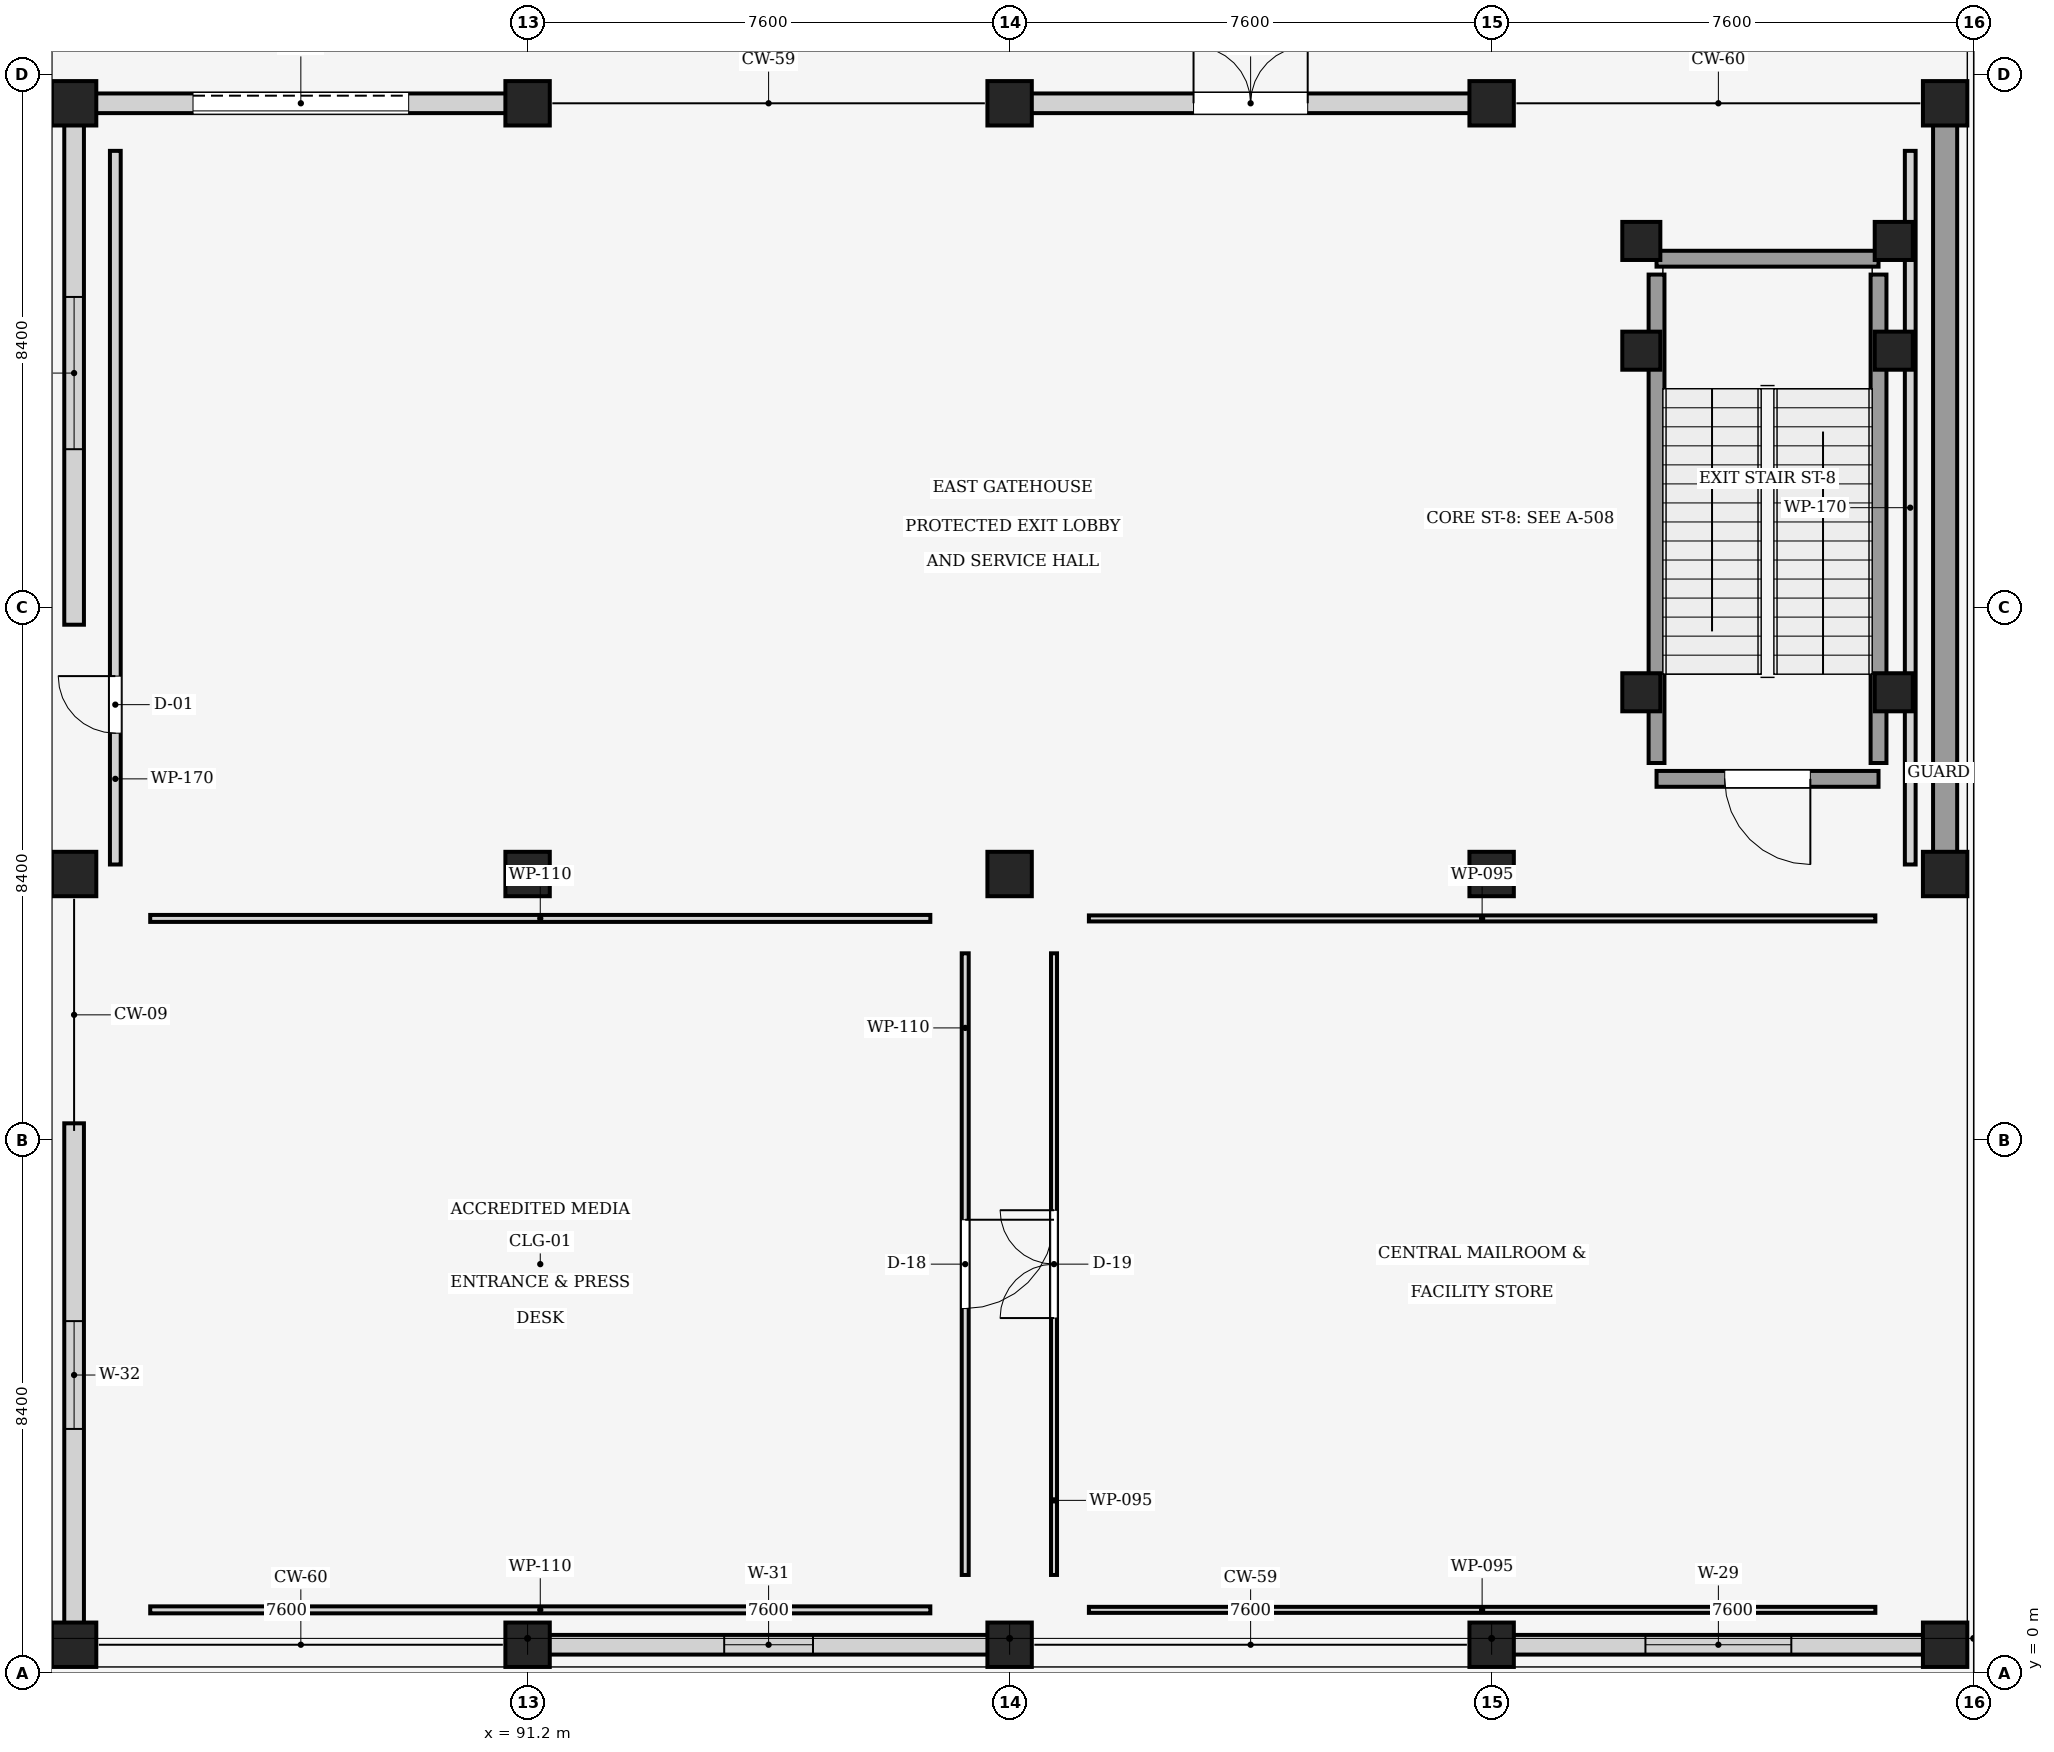
"""IFC4 building model, lengths in metres.
Left out: names, types, materials, properties, quantities, classifications, styles, units other than length and angle.
Written with IfcOpenShell. Run it as: python <this file> out.ifc"""

import sys

from ifc_helpers import new_model, si_unit, direction, frame, frame_2d, origin, origin_2d, place, context, subcontext, project, spatial, rectangle, extrude, element, fill, save


model = new_model("IFC4")
c1 = context("Model", 3, precision=1e-05, world=origin(), true_north=direction((0.0, 1.0)))
c2 = subcontext(c1, "Body", "Model", "MODEL_VIEW")
j1 = project(units=[si_unit("LENGTHUNIT", "METRE"), si_unit("PLANEANGLEUNIT", "RADIAN")], contexts=[c1])
p1 = place(None, origin())
s1 = spatial("IfcSite", under=j1, at=p1, CompositionType="ELEMENT")
p2 = place(p1, origin())
s2 = spatial("IfcBuilding", under=s1, at=p2, CompositionType="ELEMENT")
p3 = place(p2, origin())
s3 = spatial("IfcBuildingStorey", under=s2, at=p3, CompositionType="ELEMENT", Elevation=0.0)
for number, where, z_axis, x_axis in (
    (1, (84.05, 0.45, 0.0), (0.0, 0.0, 1.0), (1.0, 0.0, 0.0)),
    (2, (84.05, 12.6, 0.0), (0.0, 0.0, 1.0), (1.0, 0.0, 0.0)),
    (3, (84.05, 24.75, 0.0), (0.0, 0.0, 1.0), (1.0, 0.0, 0.0)),
    (4, (91.2, 0.45, 0.0), (0.0, 0.0, 1.0), (1.0, 0.0, 0.0)),
    (5, (91.2, 12.6, 0.0), (0.0, 0.0, 1.0), (1.0, 0.0, 0.0)),
    (6, (91.2, 24.75, 0.0), (0.0, 0.0, 1.0), (1.0, 0.0, 0.0)),
    (7, (98.8, 0.45, 0.0), (0.0, 0.0, 1.0), (1.0, 0.0, 0.0)),
    (8, (98.8, 12.6, 0.0), (0.0, 0.0, 1.0), (1.0, 0.0, 0.0)),
    (9, (98.8, 24.75, 0.0), (0.0, 0.0, 1.0), (1.0, 0.0, 0.0)),
    (10, (106.4, 0.45, 0.0), (0.0, 0.0, 1.0), (1.0, 0.0, 0.0)),
    (11, (106.4, 12.6, 0.0), (0.0, 0.0, 1.0), (1.0, 0.0, 0.0)),
    (12, (106.4, 24.75, 0.0), (0.0, 0.0, 1.0), (1.0, 0.0, 0.0)),
    (13, (113.55, 0.45, 0.0), (0.0, 0.0, 1.0), (1.0, 0.0, 0.0)),
    (14, (113.55, 12.6, 0.0), (0.0, 0.0, 1.0), (1.0, 0.0, 0.0)),
    (15, (113.55, 24.75, 0.0), (0.0, 0.0, 1.0), (1.0, 0.0, 0.0)),
):
    element("IfcColumn", number, at=place(p3, frame(where, z_axis=z_axis, x_axis=x_axis)), inside=s3, PredefinedType="COLUMN", context=c2, shape_type="SweptSolid", body=[
        extrude(rectangle(XDim=0.7, YDim=0.7, at=origin_2d()), origin(), (0.0, 0.0, 1.0), 5.1),
    ])
for number, where, z_axis, x_axis in (
    (16, (112.74, 15.465, 0.0), (0.0, 0.0, 1.0), (1.0, 0.0, 0.0)),
    (17, (108.76, 15.465, 0.0), (0.0, 0.0, 1.0), (1.0, 0.0, 0.0)),
    (18, (112.74, 20.85, 0.0), (0.0, 0.0, 1.0), (1.0, 0.0, 0.0)),
    (19, (108.76, 20.85, 0.0), (0.0, 0.0, 1.0), (1.0, 0.0, 0.0)),
    (20, (112.74, 22.58, 0.0), (0.0, 0.0, 1.0), (1.0, 0.0, 0.0)),
    (21, (108.76, 22.58, 0.0), (0.0, 0.0, 1.0), (1.0, 0.0, 0.0)),
):
    element("IfcColumn", number, at=place(p3, frame(where, z_axis=z_axis, x_axis=x_axis)), inside=s3, PredefinedType="COLUMN", context=c2, shape_type="SweptSolid", body=[
        extrude(rectangle(XDim=0.6, YDim=0.6, at=origin_2d()), origin(), (0.0, 0.0, 1.0), 5.1),
    ])
p4 = place(p3, frame((113.265, 0.45, 0.0), z_axis=(0.0, 0.0, 1.0), x_axis=(-1.0, 0.0, 0.0)))
e22 = element("IfcWall", 22, at=p4, inside=s3, PredefinedType="STANDARD", context=c2, shape_type="SweptSolid", body=[
    extrude(rectangle(XDim=6.58, YDim=0.31, at=frame_2d((3.29, 0.0))), origin(), (0.0, 0.0, 1.0), 4.045),
])
p5 = place(p4, frame((2.14, 0.0, 0.85)))
e23 = element("IfcOpeningElement", 23, at=p5, cuts=e22, PredefinedType="OPENING", context=c2, shape_type="SweptSolid", body=[
    extrude(rectangle(XDim=2.3, YDim=1.85, at=frame_2d((1.15, 0.925))), frame((0.0, 0.165, 0.0), z_axis=(0.0, -1.0, 0.0), x_axis=(1.0, 0.0, 0.0)), (0.0, 0.0, 1.0), 0.33),
])
p6 = place(p3, frame((98.515, 0.45, 0.0), z_axis=(0.0, 0.0, 1.0), x_axis=(-1.0, 0.0, 0.0)))
e24 = element("IfcWall", 24, at=p6, inside=s3, PredefinedType="STANDARD", context=c2, shape_type="SweptSolid", body=[
    extrude(rectangle(XDim=7.03, YDim=0.31, at=frame_2d((3.515, 0.0))), origin(), (0.0, 0.0, 1.0), 4.045),
])
p7 = place(p6, frame((2.815, 0.0, 0.85)))
e25 = element("IfcOpeningElement", 25, at=p7, cuts=e24, PredefinedType="OPENING", context=c2, shape_type="SweptSolid", body=[
    extrude(rectangle(XDim=1.4, YDim=2.05, at=frame_2d((0.7, 1.025))), frame((0.0, 0.165, 0.0), z_axis=(0.0, -1.0, 0.0), x_axis=(1.0, 0.0, 0.0)), (0.0, 0.0, 1.0), 0.33),
])
p8 = place(p3, frame((113.55, 24.465, 0.0), z_axis=(0.0, 0.0, 1.0), x_axis=(0.0, -1.0, 0.0)))
e26 = element("IfcWall", 26, at=p8, inside=s3, PredefinedType="SHEAR", context=c2, shape_type="SweptSolid", body=[
    extrude(rectangle(XDim=11.58, YDim=0.38, at=frame_2d((5.79, 0.0))), origin(), (0.0, 0.0, 1.0), 4.75),
])
p9 = place(p3, frame((84.335, 24.75, 0.0), z_axis=(0.0, 0.0, 1.0), x_axis=(1.0, 0.0, 0.0)))
e27 = element("IfcWall", 27, at=p9, inside=s3, PredefinedType="STANDARD", context=c2, shape_type="SweptSolid", body=[
    extrude(rectangle(XDim=6.58, YDim=0.31, at=frame_2d((3.29, 0.0))), origin(), (0.0, 0.0, 1.0), 4.045),
])
p10 = place(p9, frame((1.59, 0.0, 0.0)))
e28 = element("IfcOpeningElement", 28, at=p10, cuts=e27, PredefinedType="OPENING", context=c2, shape_type="SweptSolid", body=[
    extrude(rectangle(XDim=3.4, YDim=3.0, at=frame_2d((1.7, 1.5))), frame((0.0, 0.165, 0.0), z_axis=(0.0, -1.0, 0.0), x_axis=(1.0, 0.0, 0.0)), (0.0, 0.0, 1.0), 0.33),
])
p11 = place(p3, frame((99.085, 24.75, 0.0), z_axis=(0.0, 0.0, 1.0), x_axis=(1.0, 0.0, 0.0)))
e29 = element("IfcWall", 29, at=p11, inside=s3, PredefinedType="STANDARD", context=c2, shape_type="SweptSolid", body=[
    extrude(rectangle(XDim=7.03, YDim=0.31, at=frame_2d((3.515, 0.0))), origin(), (0.0, 0.0, 1.0), 4.045),
])
p12 = place(p11, frame((2.615, 0.0, 0.0)))
e30 = element("IfcOpeningElement", 30, at=p12, cuts=e29, PredefinedType="OPENING", context=c2, shape_type="SweptSolid", body=[
    extrude(rectangle(XDim=1.8, YDim=2.35, at=frame_2d((0.9, 1.175))), frame((0.0, 0.165, 0.0), z_axis=(0.0, -1.0, 0.0), x_axis=(1.0, 0.0, 0.0)), (0.0, 0.0, 1.0), 0.33),
])
p13 = place(p3, frame((84.05, 0.735, 0.0), z_axis=(0.0, 0.0, 1.0), x_axis=(0.0, 1.0, 0.0)))
e31 = element("IfcWall", 31, at=p13, inside=s3, PredefinedType="STANDARD", context=c2, shape_type="SweptSolid", body=[
    extrude(rectangle(XDim=7.935, YDim=0.31, at=frame_2d((3.967, 0.0))), origin(), (0.0, 0.0, 1.0), 4.195),
])
p14 = place(p13, frame((3.117, 0.0, 0.85)))
e32 = element("IfcOpeningElement", 32, at=p14, cuts=e31, PredefinedType="OPENING", context=c2, shape_type="SweptSolid", body=[
    extrude(rectangle(XDim=1.7, YDim=2.05, at=frame_2d((0.85, 1.025))), frame((0.0, 0.165, 0.0), z_axis=(0.0, -1.0, 0.0), x_axis=(1.0, 0.0, 0.0)), (0.0, 0.0, 1.0), 0.33),
])
p15 = place(p3, frame((84.05, 16.53, 0.0), z_axis=(0.0, 0.0, 1.0), x_axis=(0.0, 1.0, 0.0)))
e33 = element("IfcWall", 33, at=p15, inside=s3, PredefinedType="STANDARD", context=c2, shape_type="SweptSolid", body=[
    extrude(rectangle(XDim=7.935, YDim=0.31, at=frame_2d((3.968, 0.0))), origin(), (0.0, 0.0, 1.0), 4.195),
])
p16 = place(p15, frame((2.767, 0.0, 0.85)))
e34 = element("IfcOpeningElement", 34, at=p16, cuts=e33, PredefinedType="OPENING", context=c2, shape_type="SweptSolid", body=[
    extrude(rectangle(XDim=2.4, YDim=2.05, at=frame_2d((1.2, 1.025))), frame((0.0, 0.165, 0.0), z_axis=(0.0, -1.0, 0.0), x_axis=(1.0, 0.0, 0.0)), (0.0, 0.0, 1.0), 0.33),
])
p17 = place(p3, frame((112.5, 14.1, 0.0), z_axis=(0.0, 0.0, 1.0), x_axis=(-1.0, 0.0, 0.0)))
e35 = element("IfcWall", 35, at=p17, inside=s3, PredefinedType="SHEAR", context=c2, shape_type="SweptSolid", body=[
    extrude(rectangle(XDim=3.5, YDim=0.25, at=frame_2d((1.75, 0.0))), origin(), (0.0, 0.0, 1.0), 5.1),
])
p18 = place(p17, frame((1.075, 0.0, 0.0)))
e36 = element("IfcOpeningElement", 36, at=p18, cuts=e35, PredefinedType="OPENING", context=c2, shape_type="SweptSolid", body=[
    extrude(rectangle(XDim=1.35, YDim=2.2, at=frame_2d((0.675, 1.1))), frame((0.0, 0.135, 0.0), z_axis=(0.0, -1.0, 0.0), x_axis=(1.0, 0.0, 0.0)), (0.0, 0.0, 1.0), 0.27),
])
p19 = place(p3, frame((109.0, 14.35, 0.0), z_axis=(0.0, 0.0, 1.0), x_axis=(0.0, 1.0, 0.0)))
e37 = element("IfcWall", 37, at=p19, inside=s3, PredefinedType="SHEAR", context=c2, shape_type="SweptSolid", body=[
    extrude(rectangle(XDim=7.7, YDim=0.25, at=frame_2d((3.85, 0.0))), origin(), (0.0, 0.0, 1.0), 5.1),
])
p20 = place(p3, frame((109.0, 22.3, 0.0), z_axis=(0.0, 0.0, 1.0), x_axis=(1.0, 0.0, 0.0)))
e38 = element("IfcWall", 38, at=p20, inside=s3, PredefinedType="SHEAR", context=c2, shape_type="SweptSolid", body=[
    extrude(rectangle(XDim=3.5, YDim=0.25, at=frame_2d((1.75, 0.0))), origin(), (0.0, 0.0, 1.0), 5.1),
])
p21 = place(p3, frame((112.5, 22.05, 0.0), z_axis=(0.0, 0.0, 1.0), x_axis=(0.0, -1.0, 0.0)))
e39 = element("IfcWall", 39, at=p21, inside=s3, PredefinedType="SHEAR", context=c2, shape_type="SweptSolid", body=[
    extrude(rectangle(XDim=7.7, YDim=0.25, at=frame_2d((3.85, 0.0))), origin(), (0.0, 0.0, 1.0), 5.1),
])
p22 = place(p3, frame((98.1, 11.35, 0.0), z_axis=(0.0, 0.0, 1.0), x_axis=(0.0, -1.0, 0.0)))
e40 = element("IfcWall", 40, at=p22, inside=s3, PredefinedType="PARTITIONING", context=c2, shape_type="SweptSolid", body=[
    extrude(rectangle(XDim=9.8, YDim=0.11, at=frame_2d((4.9, 0.0))), origin(), (0.0, 0.0, 1.0), 4.73),
])
p23 = place(p22, frame((4.2, 0.0, 0.0)))
e41 = element("IfcOpeningElement", 41, at=p23, cuts=e40, PredefinedType="OPENING", context=c2, shape_type="SweptSolid", body=[
    extrude(rectangle(XDim=1.4, YDim=2.35, at=frame_2d((0.7, 1.175))), frame((0.0, 0.065, 0.0), z_axis=(0.0, -1.0, 0.0), x_axis=(1.0, 0.0, 0.0)), (0.0, 0.0, 1.0), 0.13),
])
for number, where, z_axis, x_axis in (
    (42, (85.25, 11.9, 0.0), (0.0, 0.0, 1.0), (1.0, 0.0, 0.0)),
    (43, (97.55, 1.0, 0.0), (0.0, 0.0, 1.0), (-1.0, 0.0, 0.0)),
):
    element("IfcWall", number, at=place(p3, frame(where, z_axis=z_axis, x_axis=x_axis)), inside=s3, PredefinedType="PARTITIONING", context=c2, shape_type="SweptSolid", body=[
        extrude(rectangle(XDim=12.3, YDim=0.11, at=frame_2d((6.15, 0.0))), origin(), (0.0, 0.0, 1.0), 4.195),
    ])
p24 = place(p3, frame((99.5, 1.55, 0.0), z_axis=(0.0, 0.0, 1.0), x_axis=(0.0, 1.0, 0.0)))
e44 = element("IfcWall", 44, at=p24, inside=s3, PredefinedType="PARTITIONING", context=c2, shape_type="SweptSolid", body=[
    extrude(rectangle(XDim=9.8, YDim=0.095, at=frame_2d((4.9, 0.0))), origin(), (0.0, 0.0, 1.0), 4.73),
])
p25 = place(p24, frame((4.05, 0.0, 0.0)))
e45 = element("IfcOpeningElement", 45, at=p25, cuts=e44, PredefinedType="OPENING", context=c2, shape_type="SweptSolid", body=[
    extrude(rectangle(XDim=1.7, YDim=2.35, at=frame_2d((0.85, 1.175))), frame((0.0, 0.057, 0.0), z_axis=(0.0, -1.0, 0.0), x_axis=(1.0, 0.0, 0.0)), (0.0, 0.0, 1.0), 0.115),
])
for number, where, z_axis, x_axis in (
    (46, (100.05, 11.9, 0.0), (0.0, 0.0, 1.0), (1.0, 0.0, 0.0)),
    (47, (112.45, 1.0, 0.0), (0.0, 0.0, 1.0), (-1.0, 0.0, 0.0)),
):
    element("IfcWall", number, at=place(p3, frame(where, z_axis=z_axis, x_axis=x_axis)), inside=s3, PredefinedType="PARTITIONING", context=c2, shape_type="SweptSolid", body=[
        extrude(rectangle(XDim=12.4, YDim=0.095, at=frame_2d((6.2, 0.0))), origin(), (0.0, 0.0, 1.0), 4.195),
    ])
p26 = place(p3, frame((84.7, 12.75, 0.0), z_axis=(0.0, 0.0, 1.0), x_axis=(0.0, 1.0, 0.0)))
e48 = element("IfcWall", 48, at=p26, inside=s3, PredefinedType="PARTITIONING", context=c2, shape_type="SweptSolid", body=[
    extrude(rectangle(XDim=11.25, YDim=0.17, at=frame_2d((5.625, 0.0))), origin(), (0.0, 0.0, 1.0), 4.045),
])
p27 = place(p26, frame((2.07, 0.0, 0.0)))
e49 = element("IfcOpeningElement", 49, at=p27, cuts=e48, PredefinedType="OPENING", context=c2, shape_type="SweptSolid", body=[
    extrude(rectangle(XDim=0.9, YDim=2.1, at=frame_2d((0.45, 1.05))), frame((0.0, 0.095, 0.0), z_axis=(0.0, -1.0, 0.0), x_axis=(1.0, 0.0, 0.0)), (0.0, 0.0, 1.0), 0.19),
])
p28 = place(p3, frame((113.0, 24.0, 0.0), z_axis=(0.0, 0.0, 1.0), x_axis=(0.0, -1.0, 0.0)))
e50 = element("IfcWall", 50, at=p28, inside=s3, PredefinedType="PARTITIONING", context=c2, shape_type="SweptSolid", body=[
    extrude(rectangle(XDim=11.25, YDim=0.17, at=frame_2d((5.625, 0.0))), origin(), (0.0, 0.0, 1.0), 2.45),
])
p29 = place(p5, origin())
e51 = element("IfcWindow", 51, at=p29, inside=s3, PartitioningType="SINGLE_PANEL", PredefinedType="WINDOW", context=c2, shape_type="SweptSolid", body=[
    extrude(rectangle(XDim=2.3, YDim=1.85, at=frame_2d((1.15, 0.925))), frame((0.0, 0.03, 0.0), z_axis=(0.0, -1.0, 0.0), x_axis=(1.0, 0.0, 0.0)), (0.0, 0.0, 1.0), 0.06),
])
fill(e23, e51)
p30 = place(p7, origin())
e52 = element("IfcWindow", 52, at=p30, inside=s3, PartitioningType="SINGLE_PANEL", PredefinedType="WINDOW", context=c2, shape_type="SweptSolid", body=[
    extrude(rectangle(XDim=1.4, YDim=2.05, at=frame_2d((0.7, 1.025))), frame((0.0, 0.03, 0.0), z_axis=(0.0, -1.0, 0.0), x_axis=(1.0, 0.0, 0.0)), (0.0, 0.0, 1.0), 0.06),
])
fill(e25, e52)
p31 = place(p10, origin())
e53 = element("IfcDoor", 53, at=p31, inside=s3, OperationType="ROLLINGUP", PredefinedType="GATE", context=c2, shape_type="SweptSolid", body=[
    extrude(rectangle(XDim=3.4, YDim=3.0, at=frame_2d((1.7, 1.5))), frame((0.0, 0.025, 0.0), z_axis=(0.0, -1.0, 0.0), x_axis=(1.0, 0.0, 0.0)), (0.0, 0.0, 1.0), 0.05),
])
fill(e28, e53)
p32 = place(p12, origin())
e54 = element("IfcDoor", 54, at=p32, inside=s3, OperationType="DOUBLE_DOOR_SINGLE_SWING", PredefinedType="DOOR", context=c2, shape_type="SweptSolid", body=[
    extrude(rectangle(XDim=1.8, YDim=2.35, at=frame_2d((0.9, 1.175))), frame((0.0, 0.025, 0.0), z_axis=(0.0, -1.0, 0.0), x_axis=(1.0, 0.0, 0.0)), (0.0, 0.0, 1.0), 0.05),
])
fill(e30, e54)
p33 = place(p14, origin())
e55 = element("IfcWindow", 55, at=p33, inside=s3, PartitioningType="SINGLE_PANEL", PredefinedType="WINDOW", context=c2, shape_type="SweptSolid", body=[
    extrude(rectangle(XDim=1.7, YDim=2.05, at=frame_2d((0.85, 1.025))), frame((0.0, 0.03, 0.0), z_axis=(0.0, -1.0, 0.0), x_axis=(1.0, 0.0, 0.0)), (0.0, 0.0, 1.0), 0.06),
])
fill(e32, e55)
p34 = place(p16, origin())
e56 = element("IfcWindow", 56, at=p34, inside=s3, PartitioningType="SINGLE_PANEL", PredefinedType="WINDOW", context=c2, shape_type="SweptSolid", body=[
    extrude(rectangle(XDim=2.4, YDim=2.05, at=frame_2d((1.2, 1.025))), frame((0.0, 0.03, 0.0), z_axis=(0.0, -1.0, 0.0), x_axis=(1.0, 0.0, 0.0)), (0.0, 0.0, 1.0), 0.06),
])
fill(e34, e56)
p35 = place(p18, origin())
e57 = element("IfcDoor", 57, at=p35, inside=s3, OperationType="SINGLE_SWING_LEFT", PredefinedType="DOOR", context=c2, shape_type="SweptSolid", body=[
    extrude(rectangle(XDim=1.35, YDim=2.2, at=frame_2d((0.675, 1.1))), frame((0.0, 0.025, 0.0), z_axis=(0.0, -1.0, 0.0), x_axis=(1.0, 0.0, 0.0)), (0.0, 0.0, 1.0), 0.05),
])
fill(e36, e57)
p36 = place(p23, origin())
e58 = element("IfcDoor", 58, at=p36, inside=s3, OperationType="SINGLE_SWING_LEFT", PredefinedType="DOOR", context=c2, shape_type="SweptSolid", body=[
    extrude(rectangle(XDim=1.4, YDim=2.35, at=frame_2d((0.7, 1.175))), frame((0.0, 0.025, 0.0), z_axis=(0.0, -1.0, 0.0), x_axis=(1.0, 0.0, 0.0)), (0.0, 0.0, 1.0), 0.05),
])
fill(e41, e58)
p37 = place(p25, origin())
e59 = element("IfcDoor", 59, at=p37, inside=s3, OperationType="DOUBLE_DOOR_SINGLE_SWING", PredefinedType="DOOR", context=c2, shape_type="SweptSolid", body=[
    extrude(rectangle(XDim=1.7, YDim=2.35, at=frame_2d((0.85, 1.175))), frame((0.0, 0.025, 0.0), z_axis=(0.0, -1.0, 0.0), x_axis=(1.0, 0.0, 0.0)), (0.0, 0.0, 1.0), 0.05),
])
fill(e45, e59)
p38 = place(p27, origin())
e60 = element("IfcDoor", 60, at=p38, inside=s3, OperationType="SINGLE_SWING_RIGHT", PredefinedType="DOOR", context=c2, shape_type="SweptSolid", body=[
    extrude(rectangle(XDim=0.9, YDim=2.1, at=frame_2d((0.45, 1.05))), frame((0.0, 0.025, 0.0), z_axis=(0.0, -1.0, 0.0), x_axis=(1.0, 0.0, 0.0)), (0.0, 0.0, 1.0), 0.05),
])
fill(e49, e60)
save(model, sys.argv[1])
